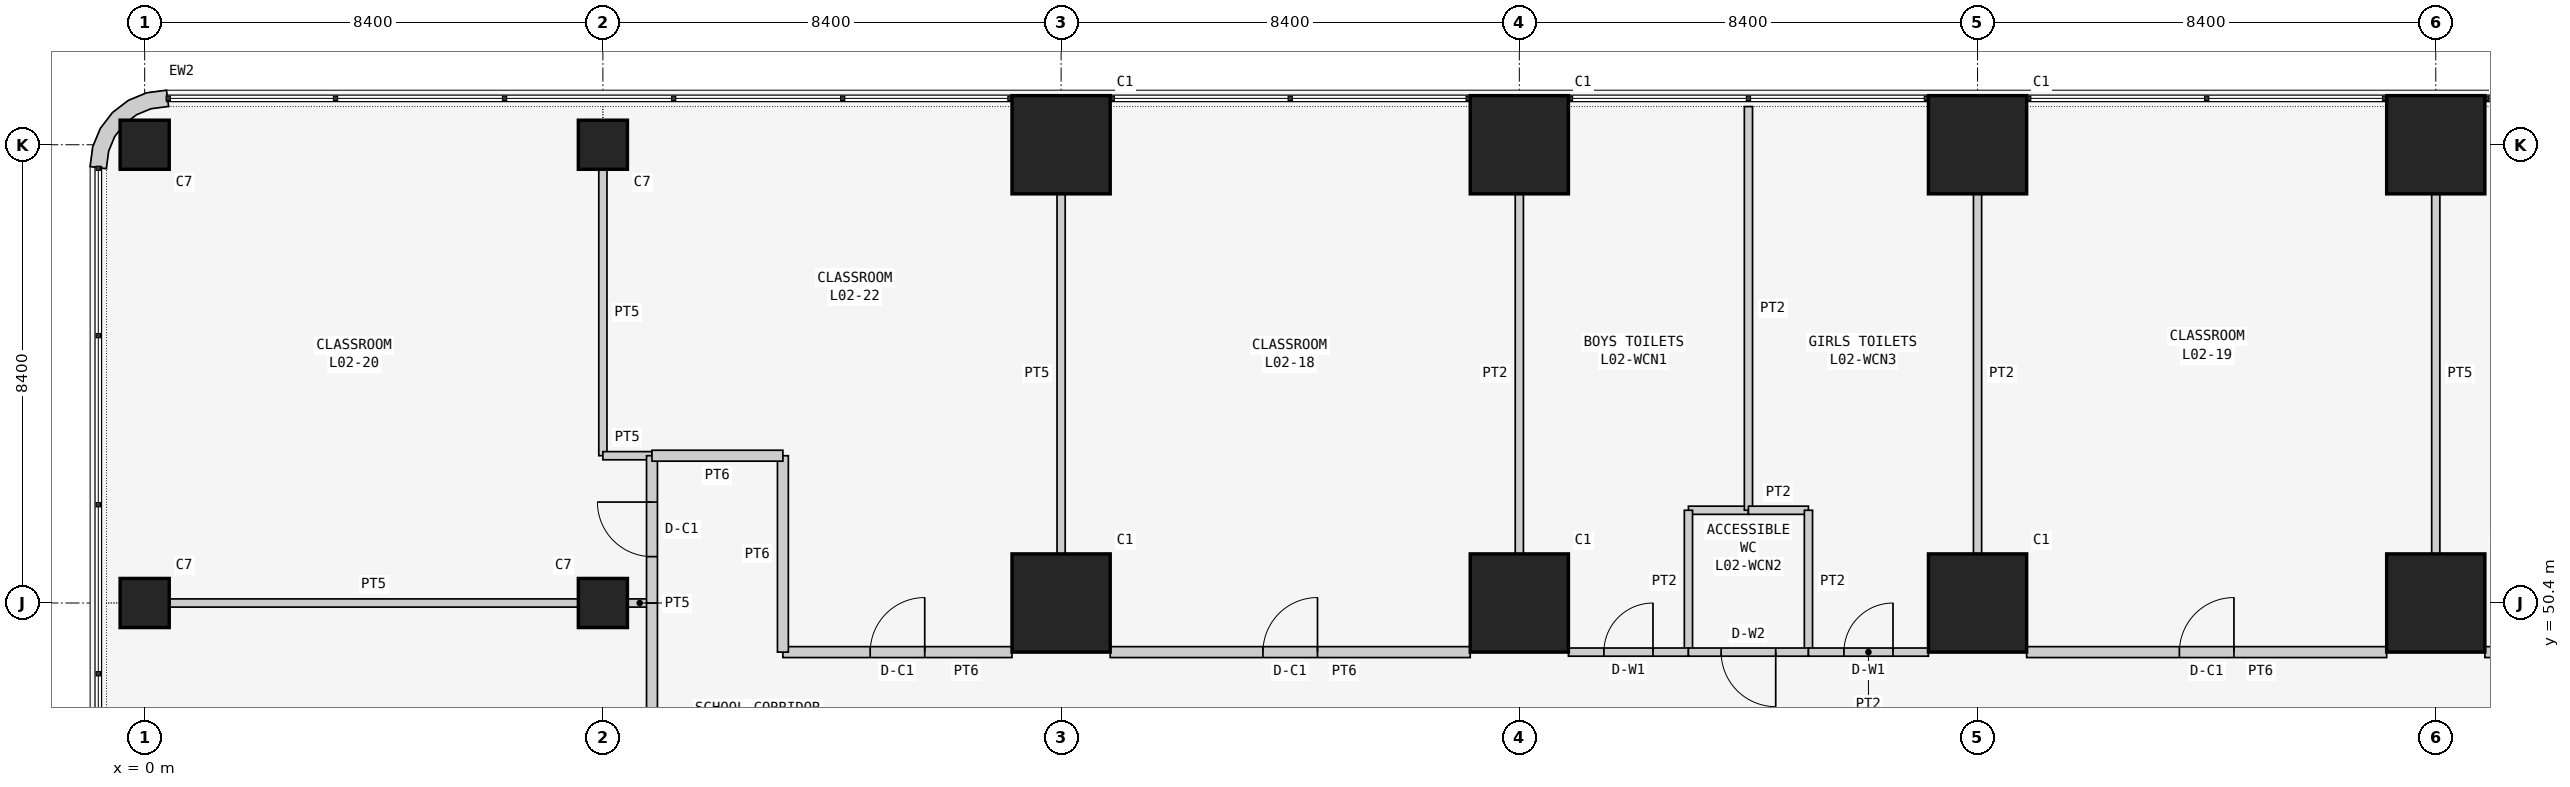
"""IFC4 building model, lengths in metres.
Left out: names, types, materials, properties, quantities, classifications, styles, units other than length and angle.
Written with IfcOpenShell. Run it as: python <this file> out.ifc"""

import sys

from ifc_helpers import new_model, si_unit, direction, frame, frame_2d, origin, origin_2d, place, context, subcontext, project, spatial, polyline, rectangle, outline, extrude, element, fill, save


model = new_model("IFC4")
c1 = context("Model", 3, precision=1e-05, world=origin(), true_north=direction((0.0, 1.0)))
c2 = subcontext(c1, "Body", "Model", "MODEL_VIEW")
j1 = project(units=[si_unit("LENGTHUNIT", "METRE"), si_unit("PLANEANGLEUNIT", "RADIAN")], contexts=[c1])
p1 = place(None, origin())
s1 = spatial("IfcSite", under=j1, at=p1, CompositionType="ELEMENT")
p2 = place(p1, origin())
s2 = spatial("IfcBuilding", under=s1, at=p2, CompositionType="ELEMENT")
p3 = place(p2, frame((0.0, 0.0, 10.5)))
s3 = spatial("IfcBuildingStorey", under=s2, at=p3, CompositionType="ELEMENT", Elevation=10.5)
for number, where, z_axis, x_axis in (
    (1, (0.0, 50.4, 0.0), (0.0, 0.0, 1.0), (1.0, 0.0, 0.0)),
    (2, (0.0, 58.8, 0.0), (0.0, 0.0, 1.0), (1.0, 0.0, 0.0)),
    (3, (8.4, 50.4, 0.0), (0.0, 0.0, 1.0), (1.0, 0.0, 0.0)),
    (4, (8.4, 58.8, 0.0), (0.0, 0.0, 1.0), (1.0, 0.0, 0.0)),
):
    element("IfcColumn", number, at=place(p3, frame(where, z_axis=z_axis, x_axis=x_axis)), inside=s3, PredefinedType="COLUMN", context=c2, shape_type="SweptSolid", body=[
        extrude(rectangle(XDim=0.9, YDim=0.9, at=origin_2d()), origin(), (0.0, 0.0, 1.0), 4.5),
    ])
for number, where, z_axis, x_axis in (
    (5, (16.8, 50.4, 0.0), (0.0, 0.0, 1.0), (1.0, 0.0, 0.0)),
    (6, (16.8, 58.8, 0.0), (0.0, 0.0, 1.0), (1.0, 0.0, 0.0)),
    (7, (25.2, 50.4, 0.0), (0.0, 0.0, 1.0), (1.0, 0.0, 0.0)),
    (8, (25.2, 58.8, 0.0), (0.0, 0.0, 1.0), (1.0, 0.0, 0.0)),
    (9, (33.6, 50.4, 0.0), (0.0, 0.0, 1.0), (1.0, 0.0, 0.0)),
    (10, (33.6, 58.8, 0.0), (0.0, 0.0, 1.0), (1.0, 0.0, 0.0)),
    (11, (42.0, 50.4, 0.0), (0.0, 0.0, 1.0), (1.0, 0.0, 0.0)),
    (12, (42.0, 58.8, 0.0), (0.0, 0.0, 1.0), (1.0, 0.0, 0.0)),
):
    element("IfcColumn", number, at=place(p3, frame(where, z_axis=z_axis, x_axis=x_axis)), inside=s3, PredefinedType="COLUMN", context=c2, shape_type="SweptSolid", body=[
        extrude(rectangle(XDim=1.8, YDim=1.8, at=origin_2d()), origin(), (0.0, 0.0, 1.0), 4.5),
    ])
p4 = place(p3, frame((0.445, 59.648, 0.0), z_axis=(0.0, 0.0, 1.0), x_axis=(-0.707106781187, 0.707106781187, 0.0)))
e13 = element("IfcWall", 13, at=p4, inside=s3, PredefinedType="SOLIDWALL", context=c2, shape_type="SweptSolid", body=[
    extrude(outline(polyline([(0.139, 1.904), (-0.101, 1.72), (-0.087, 1.706), (0.1, 1.463), (0.209, 1.198), (0.247, 0.914), (0.209, 0.63), (0.1, 0.365), (-0.087, 0.122), (-0.101, 0.108), (0.139, -0.076), (0.362, 0.214), (0.502, 0.552), (0.549, 0.914), (0.502, 1.276), (0.362, 1.614), (0.139, 1.904)])), origin(), (0.0, 0.0, 1.0), 4.3),
])
p5 = place(p3, frame((29.4, 52.1, 0.0), z_axis=(0.0, 0.0, 1.0), x_axis=(-1.0, 0.0, 0.0)))
e14 = element("IfcWall", 14, at=p5, inside=s3, PredefinedType="PARTITIONING", context=c2, shape_type="SweptSolid", body=[
    extrude(rectangle(XDim=1.1, YDim=0.15, at=frame_2d((0.55, 0.0))), origin(), (0.0, 0.0, 1.0), 4.3),
])
p6 = place(p3, frame((28.3, 52.1, 0.0), z_axis=(0.0, 0.0, 1.0), x_axis=(0.0, -1.0, 0.0)))
e15 = element("IfcWall", 15, at=p6, inside=s3, PredefinedType="PARTITIONING", context=c2, shape_type="SweptSolid", body=[
    extrude(rectangle(XDim=2.6, YDim=0.15, at=frame_2d((1.3, 0.0))), origin(), (0.0, 0.0, 1.0), 4.3),
])
p7 = place(p3, frame((29.4, 59.5, 0.0), z_axis=(0.0, 0.0, 1.0), x_axis=(0.0, -1.0, 0.0)))
e16 = element("IfcWall", 16, at=p7, inside=s3, PredefinedType="PARTITIONING", context=c2, shape_type="SweptSolid", body=[
    extrude(rectangle(XDim=7.4, YDim=0.15, at=frame_2d((3.7, 0.0))), origin(), (0.0, 0.0, 1.0), 3.688),
])
p8 = place(p3, frame((25.2, 51.3, 0.0), z_axis=(0.0, 0.0, 1.0), x_axis=(0.0, 1.0, 0.0)))
e17 = element("IfcWall", 17, at=p8, inside=s3, PredefinedType="PARTITIONING", context=c2, shape_type="SweptSolid", body=[
    extrude(rectangle(XDim=6.6, YDim=0.15, at=frame_2d((3.3, 0.0))), origin(), (0.0, 0.0, 1.0), 3.543),
])
p9 = place(p3, frame((28.3, 49.5, 0.0), z_axis=(0.0, 0.0, 1.0), x_axis=(-1.0, 0.0, 0.0)))
e18 = element("IfcWall", 18, at=p9, inside=s3, PredefinedType="PARTITIONING", context=c2, shape_type="SweptSolid", body=[
    extrude(rectangle(XDim=2.2, YDim=0.15, at=frame_2d((1.1, 0.0))), origin(), (0.0, 0.0, 1.0), 4.3),
])
p10 = place(p9, frame((0.65, 0.0, 0.0)))
e19 = element("IfcOpeningElement", 19, at=p10, cuts=e18, PredefinedType="OPENING", context=c2, shape_type="SweptSolid", body=[
    extrude(rectangle(XDim=0.9, YDim=2.1, at=frame_2d((0.45, 1.05))), frame((0.0, 0.085, 0.0), z_axis=(0.0, -1.0, 0.0), x_axis=(1.0, 0.0, 0.0)), (0.0, 0.0, 1.0), 0.17),
])
p11 = place(p3, frame((29.4, 52.1, 0.0), z_axis=(0.0, 0.0, 1.0), x_axis=(1.0, 0.0, 0.0)))
e20 = element("IfcWall", 20, at=p11, inside=s3, PredefinedType="PARTITIONING", context=c2, shape_type="SweptSolid", body=[
    extrude(rectangle(XDim=1.1, YDim=0.15, at=frame_2d((0.55, 0.0))), origin(), (0.0, 0.0, 1.0), 4.3),
])
p12 = place(p3, frame((30.5, 52.1, 0.0), z_axis=(0.0, 0.0, 1.0), x_axis=(0.0, -1.0, 0.0)))
e21 = element("IfcWall", 21, at=p12, inside=s3, PredefinedType="PARTITIONING", context=c2, shape_type="SweptSolid", body=[
    extrude(rectangle(XDim=2.6, YDim=0.15, at=frame_2d((1.3, 0.0))), origin(), (0.0, 0.0, 1.0), 4.3),
])
p13 = place(p3, frame((30.5, 49.5, 0.0), z_axis=(0.0, 0.0, 1.0), x_axis=(-1.0, 0.0, 0.0)))
e22 = element("IfcWall", 22, at=p13, inside=s3, PredefinedType="PARTITIONING", context=c2, shape_type="SweptSolid", body=[
    extrude(rectangle(XDim=2.2, YDim=0.15, at=frame_2d((1.1, 0.0))), origin(), (0.0, 0.0, 1.0), 4.3),
])
p14 = place(p13, frame((0.6, 0.0, 0.0)))
e23 = element("IfcOpeningElement", 23, at=p14, cuts=e22, PredefinedType="OPENING", context=c2, shape_type="SweptSolid", body=[
    extrude(rectangle(XDim=1.0, YDim=2.1, at=frame_2d((0.5, 1.05))), frame((0.0, 0.085, 0.0), z_axis=(0.0, -1.0, 0.0), x_axis=(1.0, 0.0, 0.0)), (0.0, 0.0, 1.0), 0.17),
])
p15 = place(p3, frame((33.6, 57.9, 0.0), z_axis=(0.0, 0.0, 1.0), x_axis=(0.0, -1.0, 0.0)))
e24 = element("IfcWall", 24, at=p15, inside=s3, PredefinedType="PARTITIONING", context=c2, shape_type="SweptSolid", body=[
    extrude(rectangle(XDim=6.6, YDim=0.15, at=frame_2d((3.3, 0.0))), origin(), (0.0, 0.0, 1.0), 3.543),
])
p16 = place(p3, frame((32.7, 49.5, 0.0), z_axis=(0.0, 0.0, 1.0), x_axis=(-1.0, 0.0, 0.0)))
e25 = element("IfcWall", 25, at=p16, inside=s3, PredefinedType="PARTITIONING", context=c2, shape_type="SweptSolid", body=[
    extrude(rectangle(XDim=2.2, YDim=0.15, at=frame_2d((1.1, 0.0))), origin(), (0.0, 0.0, 1.0), 4.3),
])
p17 = place(p16, frame((0.65, 0.0, 0.0)))
e26 = element("IfcOpeningElement", 26, at=p17, cuts=e25, PredefinedType="OPENING", context=c2, shape_type="SweptSolid", body=[
    extrude(rectangle(XDim=0.9, YDim=2.1, at=frame_2d((0.45, 1.05))), frame((0.0, 0.085, 0.0), z_axis=(0.0, -1.0, 0.0), x_axis=(1.0, 0.0, 0.0)), (0.0, 0.0, 1.0), 0.17),
])
p18 = place(p3, frame((0.45, 50.4, 0.0), z_axis=(0.0, 0.0, 1.0), x_axis=(1.0, 0.0, 0.0)))
e27 = element("IfcWall", 27, at=p18, inside=s3, PredefinedType="PARTITIONING", context=c2, shape_type="SweptSolid", body=[
    extrude(rectangle(XDim=7.5, YDim=0.15, at=frame_2d((3.75, 0.0))), origin(), (0.0, 0.0, 1.0), 3.543),
])
p19 = place(p3, frame((8.85, 50.4, 0.0), z_axis=(0.0, 0.0, 1.0), x_axis=(1.0, 0.0, 0.0)))
e28 = element("IfcWall", 28, at=p19, inside=s3, PredefinedType="PARTITIONING", context=c2, shape_type="SweptSolid", body=[
    extrude(rectangle(XDim=0.45, YDim=0.15, at=frame_2d((0.225, 0.0))), origin(), (0.0, 0.0, 1.0), 3.543),
])
p20 = place(p3, frame((9.3, 50.4, 0.0), z_axis=(0.0, 0.0, 1.0), x_axis=(0.0, -1.0, 0.0)))
e29 = element("IfcWall", 29, at=p20, inside=s3, PredefinedType="PARTITIONING", context=c2, shape_type="SweptSolid", body=[
    extrude(rectangle(XDim=7.5, YDim=0.2, at=frame_2d((3.75, 0.0))), origin(), (0.0, 0.0, 1.0), 4.3),
])
p21 = place(p20, frame((3.25, 0.0, 0.0)))
e30 = element("IfcOpeningElement", 30, at=p21, cuts=e29, PredefinedType="OPENING", context=c2, shape_type="SweptSolid", body=[
    extrude(rectangle(XDim=1.0, YDim=2.1, at=frame_2d((0.5, 1.05))), frame((0.0, 0.11, 0.0), z_axis=(0.0, -1.0, 0.0), x_axis=(1.0, 0.0, 0.0)), (0.0, 0.0, 1.0), 0.22),
])
p22 = place(p3, frame((16.8, 51.3, 0.0), z_axis=(0.0, 0.0, 1.0), x_axis=(0.0, 1.0, 0.0)))
e31 = element("IfcWall", 31, at=p22, inside=s3, PredefinedType="PARTITIONING", context=c2, shape_type="SweptSolid", body=[
    extrude(rectangle(XDim=6.6, YDim=0.15, at=frame_2d((3.3, 0.0))), origin(), (0.0, 0.0, 1.0), 3.543),
])
p23 = place(p3, frame((24.3, 49.5, 0.0), z_axis=(0.0, 0.0, 1.0), x_axis=(-1.0, 0.0, 0.0)))
e32 = element("IfcWall", 32, at=p23, inside=s3, PredefinedType="PARTITIONING", context=c2, shape_type="SweptSolid", body=[
    extrude(rectangle(XDim=6.6, YDim=0.2, at=frame_2d((3.3, 0.0))), origin(), (0.0, 0.0, 1.0), 4.3),
])
p24 = place(p23, frame((2.8, 0.0, 0.0)))
e33 = element("IfcOpeningElement", 33, at=p24, cuts=e32, PredefinedType="OPENING", context=c2, shape_type="SweptSolid", body=[
    extrude(rectangle(XDim=1.0, YDim=2.1, at=frame_2d((0.5, 1.05))), frame((0.0, 0.11, 0.0), z_axis=(0.0, -1.0, 0.0), x_axis=(1.0, 0.0, 0.0)), (0.0, 0.0, 1.0), 0.22),
])
p25 = place(p3, frame((42.0, 57.9, 0.0), z_axis=(0.0, 0.0, 1.0), x_axis=(0.0, -1.0, 0.0)))
e34 = element("IfcWall", 34, at=p25, inside=s3, PredefinedType="PARTITIONING", context=c2, shape_type="SweptSolid", body=[
    extrude(rectangle(XDim=6.6, YDim=0.15, at=frame_2d((3.3, 0.0))), origin(), (0.0, 0.0, 1.0), 3.543),
])
p26 = place(p3, frame((41.1, 49.5, 0.0), z_axis=(0.0, 0.0, 1.0), x_axis=(-1.0, 0.0, 0.0)))
e35 = element("IfcWall", 35, at=p26, inside=s3, PredefinedType="PARTITIONING", context=c2, shape_type="SweptSolid", body=[
    extrude(rectangle(XDim=6.6, YDim=0.2, at=frame_2d((3.3, 0.0))), origin(), (0.0, 0.0, 1.0), 4.3),
])
p27 = place(p26, frame((2.8, 0.0, 0.0)))
e36 = element("IfcOpeningElement", 36, at=p27, cuts=e35, PredefinedType="OPENING", context=c2, shape_type="SweptSolid", body=[
    extrude(rectangle(XDim=1.0, YDim=2.1, at=frame_2d((0.5, 1.05))), frame((0.0, 0.11, 0.0), z_axis=(0.0, -1.0, 0.0), x_axis=(1.0, 0.0, 0.0)), (0.0, 0.0, 1.0), 0.22),
])
p28 = place(p3, frame((8.4, 58.35, 0.0), z_axis=(0.0, 0.0, 1.0), x_axis=(0.0, -1.0, 0.0)))
e37 = element("IfcWall", 37, at=p28, inside=s3, PredefinedType="PARTITIONING", context=c2, shape_type="SweptSolid", body=[
    extrude(rectangle(XDim=5.25, YDim=0.15, at=frame_2d((2.625, 0.0))), origin(), (0.0, 0.0, 1.0), 3.543),
])
p29 = place(p3, frame((8.4, 53.1, 0.0), z_axis=(0.0, 0.0, 1.0), x_axis=(1.0, 0.0, 0.0)))
e38 = element("IfcWall", 38, at=p29, inside=s3, PredefinedType="PARTITIONING", context=c2, shape_type="SweptSolid", body=[
    extrude(rectangle(XDim=0.9, YDim=0.15, at=frame_2d((0.45, 0.0))), origin(), (0.0, 0.0, 1.0), 4.3),
])
p30 = place(p3, frame((9.3, 53.1, 0.0), z_axis=(0.0, 0.0, 1.0), x_axis=(0.0, -1.0, 0.0)))
e39 = element("IfcWall", 39, at=p30, inside=s3, PredefinedType="PARTITIONING", context=c2, shape_type="SweptSolid", body=[
    extrude(rectangle(XDim=2.7, YDim=0.2, at=frame_2d((1.35, 0.0))), origin(), (0.0, 0.0, 1.0), 4.3),
])
p31 = place(p30, frame((0.85, 0.0, 0.0)))
e40 = element("IfcOpeningElement", 40, at=p31, cuts=e39, PredefinedType="OPENING", context=c2, shape_type="SweptSolid", body=[
    extrude(rectangle(XDim=1.0, YDim=2.1, at=frame_2d((0.5, 1.05))), frame((0.0, 0.11, 0.0), z_axis=(0.0, -1.0, 0.0), x_axis=(1.0, 0.0, 0.0)), (0.0, 0.0, 1.0), 0.22),
])
p32 = place(p3, frame((15.9, 49.5, 0.0), z_axis=(0.0, 0.0, 1.0), x_axis=(-1.0, 0.0, 0.0)))
e41 = element("IfcWall", 41, at=p32, inside=s3, PredefinedType="PARTITIONING", context=c2, shape_type="SweptSolid", body=[
    extrude(rectangle(XDim=4.2, YDim=0.2, at=frame_2d((2.1, 0.0))), origin(), (0.0, 0.0, 1.0), 4.3),
])
p33 = place(p32, frame((1.6, 0.0, 0.0)))
e42 = element("IfcOpeningElement", 42, at=p33, cuts=e41, PredefinedType="OPENING", context=c2, shape_type="SweptSolid", body=[
    extrude(rectangle(XDim=1.0, YDim=2.1, at=frame_2d((0.5, 1.05))), frame((0.0, 0.11, 0.0), z_axis=(0.0, -1.0, 0.0), x_axis=(1.0, 0.0, 0.0)), (0.0, 0.0, 1.0), 0.22),
])
p34 = place(p3, frame((11.7, 49.5, 0.0), z_axis=(0.0, 0.0, 1.0), x_axis=(0.0, 1.0, 0.0)))
e43 = element("IfcWall", 43, at=p34, inside=s3, PredefinedType="PARTITIONING", context=c2, shape_type="SweptSolid", body=[
    extrude(rectangle(XDim=3.6, YDim=0.2, at=frame_2d((1.8, 0.0))), origin(), (0.0, 0.0, 1.0), 4.3),
])
p35 = place(p3, frame((11.7, 53.1, 0.0), z_axis=(0.0, 0.0, 1.0), x_axis=(-1.0, 0.0, 0.0)))
e44 = element("IfcWall", 44, at=p35, inside=s3, PredefinedType="PARTITIONING", context=c2, shape_type="SweptSolid", body=[
    extrude(rectangle(XDim=2.4, YDim=0.2, at=frame_2d((1.2, 0.0))), origin(), (0.0, 0.0, 1.0), 4.3),
])
p36 = place(p3, frame((47.1, 49.5, 0.0), z_axis=(0.0, 0.0, 1.0), x_axis=(-1.0, 0.0, 0.0)))
e45 = element("IfcWall", 45, at=p36, inside=s3, PredefinedType="PARTITIONING", context=c2, shape_type="SweptSolid", body=[
    extrude(rectangle(XDim=4.2, YDim=0.2, at=frame_2d((2.1, 0.0))), origin(), (0.0, 0.0, 1.0), 4.3),
])
p37 = place(p36, frame((1.6, 0.0, 0.0)))
e46 = element("IfcOpeningElement", 46, at=p37, cuts=e45, PredefinedType="OPENING", context=c2, shape_type="SweptSolid", body=[
    extrude(rectangle(XDim=1.0, YDim=2.1, at=frame_2d((0.5, 1.05))), frame((0.0, 0.11, 0.0), z_axis=(0.0, -1.0, 0.0), x_axis=(1.0, 0.0, 0.0)), (0.0, 0.0, 1.0), 0.22),
])
p38 = place(p10, frame((0.9, 0.0, 0.0), z_axis=(0.0, 0.0, 1.0), x_axis=(-1.0, 0.0, 0.0)))
e47 = element("IfcDoor", 47, at=p38, inside=s3, OperationType="SINGLE_SWING_RIGHT", PredefinedType="DOOR", context=c2, shape_type="SweptSolid", body=[
    extrude(rectangle(XDim=0.9, YDim=2.1, at=frame_2d((0.45, 1.05))), frame((0.0, 0.025, 0.0), z_axis=(0.0, -1.0, 0.0), x_axis=(1.0, 0.0, 0.0)), (0.0, 0.0, 1.0), 0.05),
])
fill(e19, e47)
p39 = place(p14, origin())
e48 = element("IfcDoor", 48, at=p39, inside=s3, OperationType="SINGLE_SWING_LEFT", PredefinedType="DOOR", context=c2, shape_type="SweptSolid", body=[
    extrude(rectangle(XDim=1.0, YDim=2.1, at=frame_2d((0.5, 1.05))), frame((0.0, 0.025, 0.0), z_axis=(0.0, -1.0, 0.0), x_axis=(1.0, 0.0, 0.0)), (0.0, 0.0, 1.0), 0.05),
])
fill(e23, e48)
p40 = place(p17, frame((0.9, 0.0, 0.0), z_axis=(0.0, 0.0, 1.0), x_axis=(-1.0, 0.0, 0.0)))
e49 = element("IfcDoor", 49, at=p40, inside=s3, OperationType="SINGLE_SWING_RIGHT", PredefinedType="DOOR", context=c2, shape_type="SweptSolid", body=[
    extrude(rectangle(XDim=0.9, YDim=2.1, at=frame_2d((0.45, 1.05))), frame((0.0, 0.025, 0.0), z_axis=(0.0, -1.0, 0.0), x_axis=(1.0, 0.0, 0.0)), (0.0, 0.0, 1.0), 0.05),
])
fill(e26, e49)
p41 = place(p24, frame((1.0, 0.0, 0.0), z_axis=(0.0, 0.0, 1.0), x_axis=(-1.0, 0.0, 0.0)))
e50 = element("IfcDoor", 50, at=p41, inside=s3, OperationType="SINGLE_SWING_RIGHT", PredefinedType="DOOR", context=c2, shape_type="SweptSolid", body=[
    extrude(rectangle(XDim=1.0, YDim=2.1, at=frame_2d((0.5, 1.05))), frame((0.0, 0.025, 0.0), z_axis=(0.0, -1.0, 0.0), x_axis=(1.0, 0.0, 0.0)), (0.0, 0.0, 1.0), 0.05),
])
fill(e33, e50)
p42 = place(p27, frame((1.0, 0.0, 0.0), z_axis=(0.0, 0.0, 1.0), x_axis=(-1.0, 0.0, 0.0)))
e51 = element("IfcDoor", 51, at=p42, inside=s3, OperationType="SINGLE_SWING_RIGHT", PredefinedType="DOOR", context=c2, shape_type="SweptSolid", body=[
    extrude(rectangle(XDim=1.0, YDim=2.1, at=frame_2d((0.5, 1.05))), frame((0.0, 0.025, 0.0), z_axis=(0.0, -1.0, 0.0), x_axis=(1.0, 0.0, 0.0)), (0.0, 0.0, 1.0), 0.05),
])
fill(e36, e51)
p43 = place(p31, frame((1.0, 0.0, 0.0), z_axis=(0.0, 0.0, 1.0), x_axis=(-1.0, 0.0, 0.0)))
e52 = element("IfcDoor", 52, at=p43, inside=s3, OperationType="SINGLE_SWING_RIGHT", PredefinedType="DOOR", context=c2, shape_type="SweptSolid", body=[
    extrude(rectangle(XDim=1.0, YDim=2.1, at=frame_2d((0.5, 1.05))), frame((0.0, 0.025, 0.0), z_axis=(0.0, -1.0, 0.0), x_axis=(1.0, 0.0, 0.0)), (0.0, 0.0, 1.0), 0.05),
])
fill(e40, e52)
p44 = place(p33, frame((1.0, 0.0, 0.0), z_axis=(0.0, 0.0, 1.0), x_axis=(-1.0, 0.0, 0.0)))
e53 = element("IfcDoor", 53, at=p44, inside=s3, OperationType="SINGLE_SWING_RIGHT", PredefinedType="DOOR", context=c2, shape_type="SweptSolid", body=[
    extrude(rectangle(XDim=1.0, YDim=2.1, at=frame_2d((0.5, 1.05))), frame((0.0, 0.025, 0.0), z_axis=(0.0, -1.0, 0.0), x_axis=(1.0, 0.0, 0.0)), (0.0, 0.0, 1.0), 0.05),
])
fill(e42, e53)
save(model, sys.argv[1])
